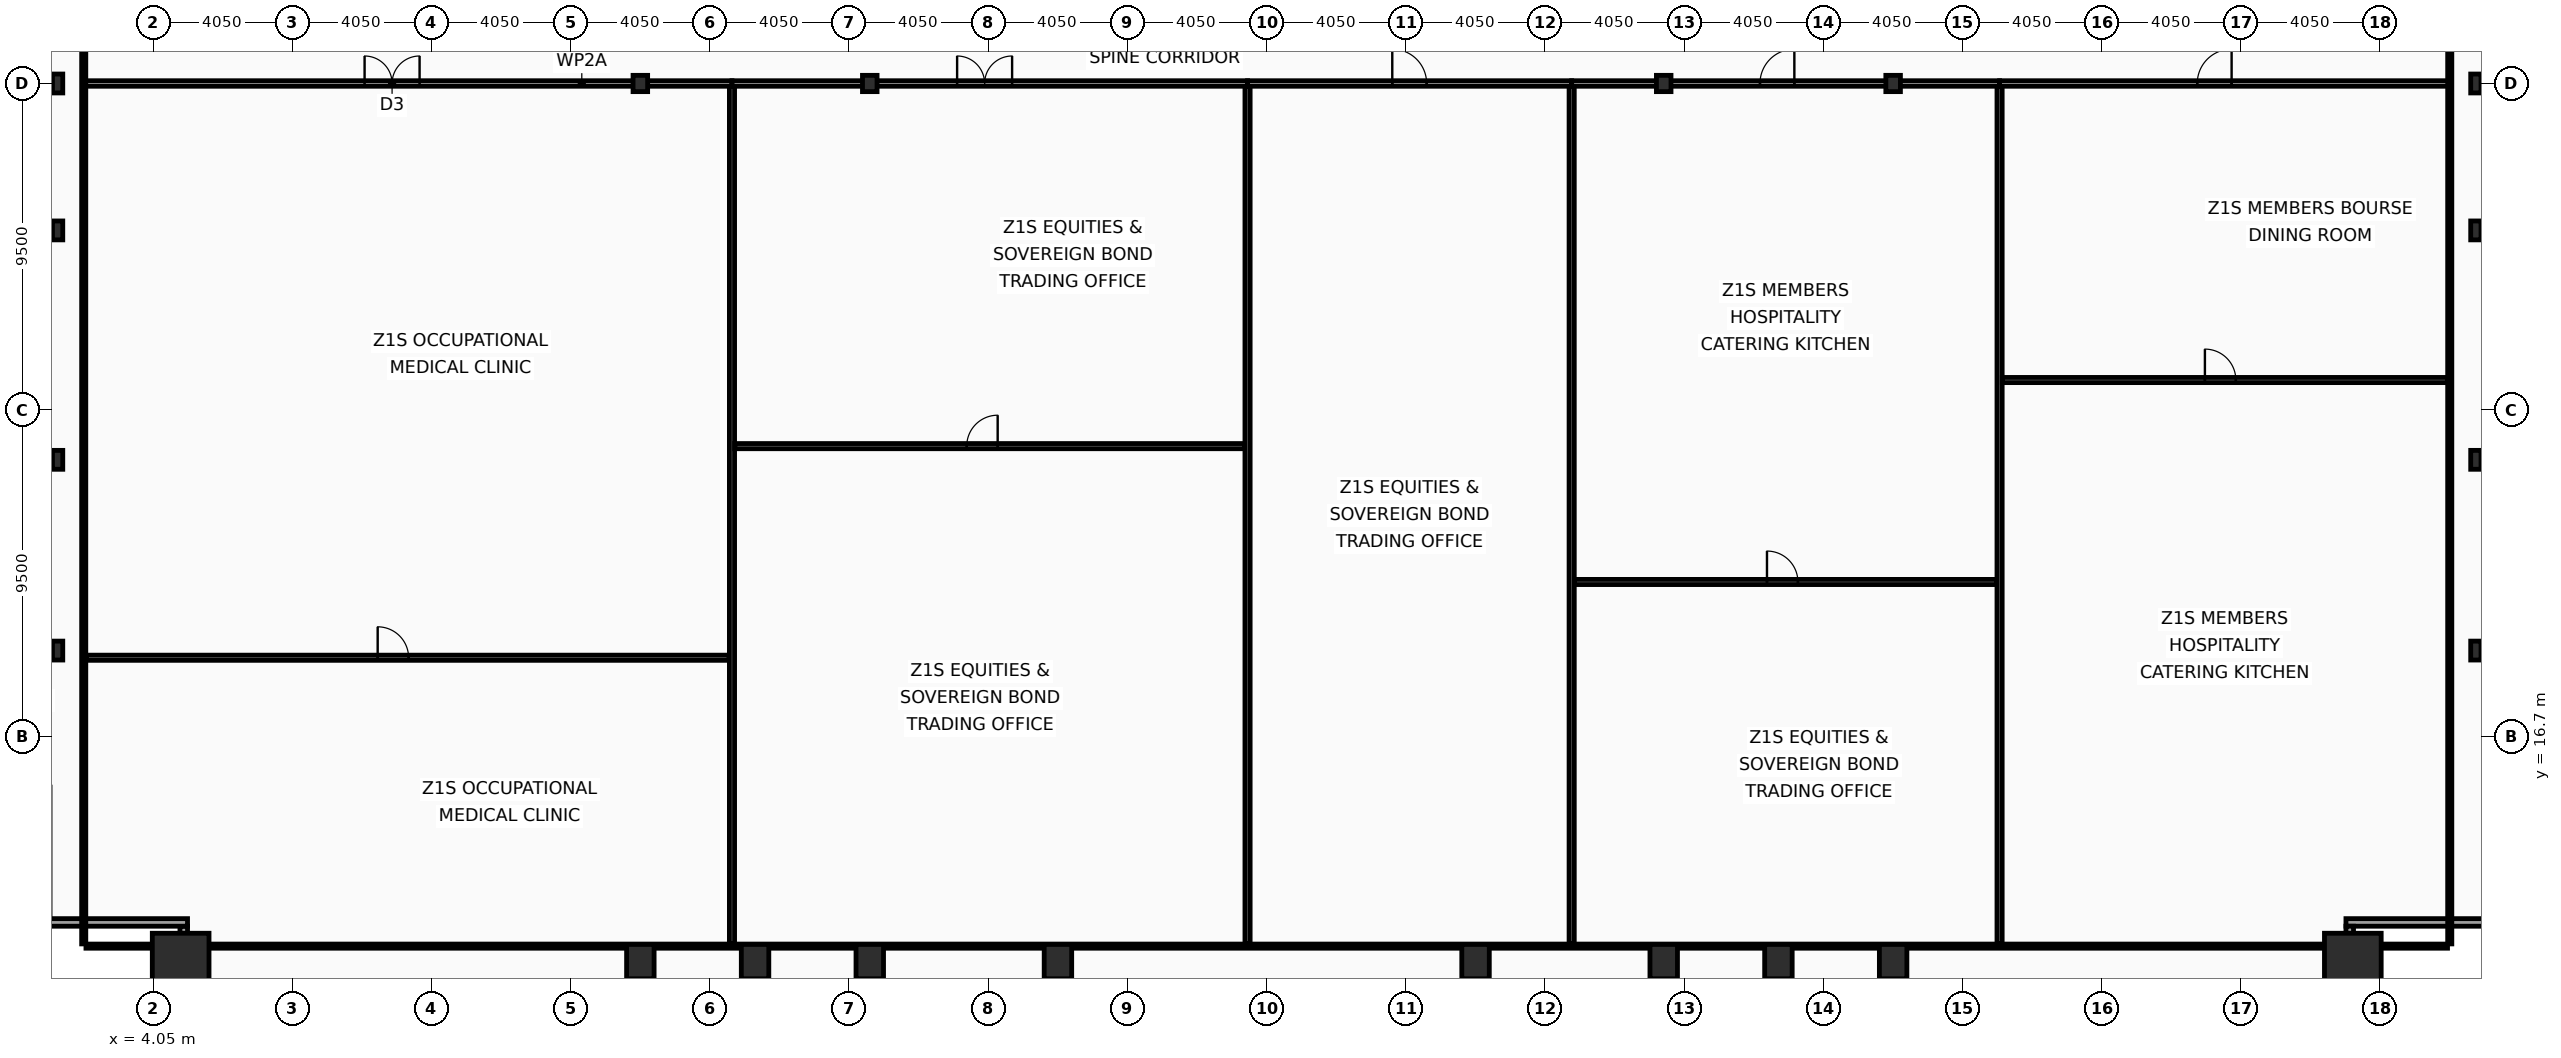
"""IFC4 building model, lengths in metres.
Left out: names, types, materials, properties, quantities, classifications, styles, units other than length and angle.
Written with IfcOpenShell. Run it as: python <this file> out.ifc"""

import sys

from ifc_helpers import new_model, si_unit, direction, frame, frame_2d, origin, origin_2d, place, context, subcontext, project, spatial, rectangle, hollow_rectangle, i_section, extrude, element, fill, save


model = new_model("IFC4")
c1 = context("Model", 3, precision=1e-05, world=origin(), true_north=direction((0.0, 1.0)))
c2 = subcontext(c1, "Body", "Model", "MODEL_VIEW")
j1 = project(units=[si_unit("LENGTHUNIT", "METRE"), si_unit("PLANEANGLEUNIT", "RADIAN")], contexts=[c1])
p1 = place(None, origin())
s1 = spatial("IfcSite", under=j1, at=p1, CompositionType="ELEMENT")
p2 = place(p1, origin())
s2 = spatial("IfcBuilding", under=s1, at=p2, CompositionType="ELEMENT")
p3 = place(p2, frame((0.0, 0.0, 41.8)))
s3 = spatial("IfcBuildingStorey", under=s2, at=p3, CompositionType="ELEMENT", Elevation=41.8)
for number, where, z_axis, x_axis in (
    (1, (4.85, 10.15, 0.0), (0.0, 0.0, 1.0), (1.0, 0.0, 0.0)),
    (2, (68.05, 10.15, 0.0), (0.0, 0.0, 1.0), (1.0, 0.0, 0.0)),
):
    element("IfcColumn", number, at=place(p3, frame(where, z_axis=z_axis, x_axis=x_axis)), inside=s3, PredefinedType="COLUMN", context=c2, shape_type="SweptSolid", body=[
        extrude(hollow_rectangle(XDim=1.65, YDim=1.65, WallThickness=0.075, at=origin_2d()), origin(), (0.0, 0.0, 1.0), 4.0),
    ])
for number, where, z_axis, x_axis in (
    (3, (18.225, 10.15, 0.0), (0.0, 0.0, 1.0), (1.0, 0.0, 0.0)),
    (4, (21.562, 10.15, 0.0), (0.0, 0.0, 1.0), (1.0, 0.0, 0.0)),
    (5, (24.9, 10.15, 0.0), (0.0, 0.0, 1.0), (1.0, 0.0, 0.0)),
    (6, (30.375, 10.15, 0.0), (0.0, 0.0, 1.0), (1.0, 0.0, 0.0)),
    (7, (42.525, 10.15, 0.0), (0.0, 0.0, 1.0), (1.0, 0.0, 0.0)),
    (8, (48.0, 10.15, 0.0), (0.0, 0.0, 1.0), (1.0, 0.0, 0.0)),
    (9, (51.337, 10.15, 0.0), (0.0, 0.0, 1.0), (1.0, 0.0, 0.0)),
    (10, (54.675, 10.15, 0.0), (0.0, 0.0, 1.0), (1.0, 0.0, 0.0)),
):
    element("IfcColumn", number, at=place(p3, frame(where, z_axis=z_axis, x_axis=x_axis)), inside=s3, PredefinedType="COLUMN", context=c2, shape_type="SweptSolid", body=[
        extrude(hollow_rectangle(XDim=0.8, YDim=1.0, WallThickness=0.055, at=origin_2d()), origin(), (0.0, 0.0, 1.0), 4.0),
    ])
for number, where, z_axis, x_axis in (
    (11, (1.27, 19.2, 0.0), (0.0, 0.0, 1.0), (1.0, 0.0, 0.0)),
    (12, (1.27, 24.75, 0.0), (0.0, 0.0, 1.0), (1.0, 0.0, 0.0)),
    (13, (1.27, 31.425, 0.0), (0.0, 0.0, 1.0), (1.0, 0.0, 0.0)),
    (14, (1.27, 35.7, 0.0), (0.0, 0.0, 1.0), (1.0, 0.0, 0.0)),
    (15, (71.63, 19.2, 0.0), (0.0, 0.0, 1.0), (1.0, 0.0, 0.0)),
    (16, (71.63, 24.75, 0.0), (0.0, 0.0, 1.0), (1.0, 0.0, 0.0)),
    (17, (71.63, 31.425, 0.0), (0.0, 0.0, 1.0), (1.0, 0.0, 0.0)),
    (18, (71.63, 35.7, 0.0), (0.0, 0.0, 1.0), (1.0, 0.0, 0.0)),
):
    element("IfcColumn", number, at=place(p3, frame(where, z_axis=z_axis, x_axis=x_axis)), inside=s3, PredefinedType="COLUMN", context=c2, shape_type="SweptSolid", body=[
        extrude(i_section(OverallWidth=0.3, OverallDepth=0.55, WebThickness=0.015, FlangeThickness=0.029, at=origin_2d()), origin(), (0.0, 0.0, 1.0), 4.0),
    ])
for number, where, z_axis, x_axis in (
    (19, (18.225, 35.7, 0.0), (0.0, 0.0, 1.0), (1.0, 0.0, 0.0)),
    (20, (24.9, 35.7, 0.0), (0.0, 0.0, 1.0), (1.0, 0.0, 0.0)),
    (21, (48.0, 35.7, 0.0), (0.0, 0.0, 1.0), (1.0, 0.0, 0.0)),
    (22, (54.675, 35.7, 0.0), (0.0, 0.0, 1.0), (1.0, 0.0, 0.0)),
):
    element("IfcColumn", number, at=place(p3, frame(where, z_axis=z_axis, x_axis=x_axis)), inside=s3, PredefinedType="COLUMN", context=c2, shape_type="SweptSolid", body=[
        extrude(i_section(OverallWidth=0.424, OverallDepth=0.474, WebThickness=0.048, FlangeThickness=0.077, at=origin_2d()), origin(), (0.0, 0.0, 1.0), 4.0),
    ])
p4 = place(p3, frame((4.94, 7.27, 0.0), z_axis=(0.0, 0.0, 1.0), x_axis=(0.0, 1.0, 0.0)))
e23 = element("IfcWall", 23, at=p4, inside=s3, PredefinedType="SOLIDWALL", context=c2, shape_type="SweptSolid", body=[
    extrude(rectangle(XDim=3.91, YDim=0.22, at=frame_2d((1.955, 0.0))), origin(), (0.0, 0.0, 1.0), 3.16),
])
for number, where, z_axis, x_axis in (
    (24, (5.05, 11.29, 0.0), (0.0, 0.0, 1.0), (-1.0, 0.0, 0.0)),
    (25, (72.07, 11.29, 0.0), (0.0, 0.0, 1.0), (-1.0, 0.0, 0.0)),
):
    element("IfcWall", number, at=place(p3, frame(where, z_axis=z_axis, x_axis=x_axis)), inside=s3, PredefinedType="SOLIDWALL", context=c2, shape_type="SweptSolid", body=[
        extrude(rectangle(XDim=4.22, YDim=0.22, at=frame_2d((2.11, 0.0))), origin(), (0.0, 0.0, 1.0), 3.16),
    ])
p5 = place(p3, frame((67.96, 11.18, 0.0), z_axis=(0.0, 0.0, 1.0), x_axis=(0.0, -1.0, 0.0)))
e26 = element("IfcWall", 26, at=p5, inside=s3, PredefinedType="SOLIDWALL", context=c2, shape_type="SweptSolid", body=[
    extrude(rectangle(XDim=3.91, YDim=0.22, at=frame_2d((1.955, 0.0))), origin(), (0.0, 0.0, 1.0), 3.16),
])
p6 = place(p3, frame((2.03, 35.7, 0.0), z_axis=(0.0, 0.0, 1.0), x_axis=(1.0, 0.0, 0.0)))
e27 = element("IfcWall", 27, at=p6, inside=s3, PredefinedType="PARTITIONING", context=c2, shape_type="SweptSolid", body=[
    extrude(rectangle(XDim=18.861, YDim=0.16, at=frame_2d((9.431, 0.0))), origin(), (0.0, 0.0, 1.0), 3.01),
])
p7 = place(p6, frame((8.172, 0.0, 0.0)))
e28 = element("IfcOpeningElement", 28, at=p7, cuts=e27, PredefinedType="OPENING", context=c2, shape_type="SweptSolid", body=[
    extrude(rectangle(XDim=1.6, YDim=2.15, at=frame_2d((0.8, 1.075))), frame((0.0, 0.09, 0.0), z_axis=(0.0, -1.0, 0.0), x_axis=(1.0, 0.0, 0.0)), (0.0, 0.0, 1.0), 0.18),
])
p8 = place(p3, frame((2.095, 18.991, 0.0), z_axis=(0.0, 0.0, 1.0), x_axis=(1.0, 0.0, 0.0)))
e29 = element("IfcWall", 29, at=p8, inside=s3, PredefinedType="PARTITIONING", context=c2, shape_type="SweptSolid", body=[
    extrude(rectangle(XDim=18.716, YDim=0.15, at=frame_2d((9.358, 0.0))), origin(), (0.0, 0.0, 1.0), 3.01),
])
p9 = place(p8, frame((8.487, 0.0, 0.0)))
e30 = element("IfcOpeningElement", 30, at=p9, cuts=e29, PredefinedType="OPENING", context=c2, shape_type="SweptSolid", body=[
    extrude(rectangle(XDim=0.9, YDim=2.05, at=frame_2d((0.45, 1.025))), frame((0.0, 0.085, 0.0), z_axis=(0.0, -1.0, 0.0), x_axis=(1.0, 0.0, 0.0)), (0.0, 0.0, 1.0), 0.17),
])
p10 = place(p3, frame((20.891, 35.7, 0.0), z_axis=(0.0, 0.0, 1.0), x_axis=(1.0, 0.0, 0.0)))
e31 = element("IfcWall", 31, at=p10, inside=s3, PredefinedType="PARTITIONING", context=c2, shape_type="SweptSolid", body=[
    extrude(rectangle(XDim=15.0, YDim=0.16, at=frame_2d((7.5, 0.0))), origin(), (0.0, 0.0, 1.0), 3.01),
])
p11 = place(p10, frame((6.55, 0.0, 0.0)))
e32 = element("IfcOpeningElement", 32, at=p11, cuts=e31, PredefinedType="OPENING", context=c2, shape_type="SweptSolid", body=[
    extrude(rectangle(XDim=1.6, YDim=2.15, at=frame_2d((0.8, 1.075))), frame((0.0, 0.09, 0.0), z_axis=(0.0, -1.0, 0.0), x_axis=(1.0, 0.0, 0.0)), (0.0, 0.0, 1.0), 0.18),
])
p12 = place(p3, frame((20.891, 10.665, 0.0), z_axis=(0.0, 0.0, 1.0), x_axis=(0.0, 1.0, 0.0)))
e33 = element("IfcWall", 33, at=p12, inside=s3, PredefinedType="PARTITIONING", context=c2, shape_type="SweptSolid", body=[
    extrude(rectangle(XDim=24.95, YDim=0.15, at=frame_2d((12.475, 0.0))), origin(), (0.0, 0.0, 1.0), 3.21),
])
p13 = place(p3, frame((20.971, 25.148, 0.0), z_axis=(0.0, 0.0, 1.0), x_axis=(1.0, 0.0, 0.0)))
e34 = element("IfcWall", 34, at=p13, inside=s3, PredefinedType="PARTITIONING", context=c2, shape_type="SweptSolid", body=[
    extrude(rectangle(XDim=14.841, YDim=0.15, at=frame_2d((7.42, 0.0))), origin(), (0.0, 0.0, 1.0), 3.01),
])
p14 = place(p13, frame((6.75, 0.0, 0.0)))
e35 = element("IfcOpeningElement", 35, at=p14, cuts=e34, PredefinedType="OPENING", context=c2, shape_type="SweptSolid", body=[
    extrude(rectangle(XDim=0.9, YDim=2.05, at=frame_2d((0.45, 1.025))), frame((0.0, 0.085, 0.0), z_axis=(0.0, -1.0, 0.0), x_axis=(1.0, 0.0, 0.0)), (0.0, 0.0, 1.0), 0.17),
])
p15 = place(p3, frame((35.892, 35.7, 0.0), z_axis=(0.0, 0.0, 1.0), x_axis=(1.0, 0.0, 0.0)))
e36 = element("IfcWall", 36, at=p15, inside=s3, PredefinedType="PARTITIONING", context=c2, shape_type="SweptSolid", body=[
    extrude(rectangle(XDim=9.43, YDim=0.16, at=frame_2d((4.715, 0.0))), origin(), (0.0, 0.0, 1.0), 3.01),
])
p16 = place(p15, frame((4.211, 0.0, 0.0)))
e37 = element("IfcOpeningElement", 37, at=p16, cuts=e36, PredefinedType="OPENING", context=c2, shape_type="SweptSolid", body=[
    extrude(rectangle(XDim=1.0, YDim=2.05, at=frame_2d((0.5, 1.025))), frame((0.0, 0.09, 0.0), z_axis=(0.0, -1.0, 0.0), x_axis=(1.0, 0.0, 0.0)), (0.0, 0.0, 1.0), 0.18),
])
p17 = place(p3, frame((35.892, 10.665, 0.0), z_axis=(0.0, 0.0, 1.0), x_axis=(0.0, 1.0, 0.0)))
e38 = element("IfcWall", 38, at=p17, inside=s3, PredefinedType="PARTITIONING", context=c2, shape_type="SweptSolid", body=[
    extrude(rectangle(XDim=24.95, YDim=0.15, at=frame_2d((12.475, 0.0))), origin(), (0.0, 0.0, 1.0), 3.21),
])
p18 = place(p3, frame((45.322, 35.7, 0.0), z_axis=(0.0, 0.0, 1.0), x_axis=(1.0, 0.0, 0.0)))
e39 = element("IfcWall", 39, at=p18, inside=s3, PredefinedType="PARTITIONING", context=c2, shape_type="SweptSolid", body=[
    extrude(rectangle(XDim=12.45, YDim=0.16, at=frame_2d((6.225, 0.0))), origin(), (0.0, 0.0, 1.0), 3.01),
])
p19 = place(p18, frame((5.479, 0.0, 0.0)))
e40 = element("IfcOpeningElement", 40, at=p19, cuts=e39, PredefinedType="OPENING", context=c2, shape_type="SweptSolid", body=[
    extrude(rectangle(XDim=1.0, YDim=2.05, at=frame_2d((0.5, 1.025))), frame((0.0, 0.09, 0.0), z_axis=(0.0, -1.0, 0.0), x_axis=(1.0, 0.0, 0.0)), (0.0, 0.0, 1.0), 0.18),
])
p20 = place(p3, frame((45.322, 10.665, 0.0), z_axis=(0.0, 0.0, 1.0), x_axis=(0.0, 1.0, 0.0)))
e41 = element("IfcWall", 41, at=p20, inside=s3, PredefinedType="PARTITIONING", context=c2, shape_type="SweptSolid", body=[
    extrude(rectangle(XDim=24.95, YDim=0.15, at=frame_2d((12.475, 0.0))), origin(), (0.0, 0.0, 1.0), 3.21),
])
p21 = place(p3, frame((45.402, 21.196, 0.0), z_axis=(0.0, 0.0, 1.0), x_axis=(1.0, 0.0, 0.0)))
e42 = element("IfcWall", 42, at=p21, inside=s3, PredefinedType="PARTITIONING", context=c2, shape_type="SweptSolid", body=[
    extrude(rectangle(XDim=12.29, YDim=0.15, at=frame_2d((6.145, 0.0))), origin(), (0.0, 0.0, 1.0), 3.01),
])
p22 = place(p21, frame((5.603, 0.0, 0.0)))
e43 = element("IfcOpeningElement", 43, at=p22, cuts=e42, PredefinedType="OPENING", context=c2, shape_type="SweptSolid", body=[
    extrude(rectangle(XDim=0.9, YDim=2.05, at=frame_2d((0.45, 1.025))), frame((0.0, 0.085, 0.0), z_axis=(0.0, -1.0, 0.0), x_axis=(1.0, 0.0, 0.0)), (0.0, 0.0, 1.0), 0.17),
])
p23 = place(p3, frame((57.772, 35.7, 0.0), z_axis=(0.0, 0.0, 1.0), x_axis=(1.0, 0.0, 0.0)))
e44 = element("IfcWall", 44, at=p23, inside=s3, PredefinedType="PARTITIONING", context=c2, shape_type="SweptSolid", body=[
    extrude(rectangle(XDim=13.098, YDim=0.16, at=frame_2d((6.549, 0.0))), origin(), (0.0, 0.0, 1.0), 3.01),
])
p24 = place(p23, frame((5.751, 0.0, 0.0)))
e45 = element("IfcOpeningElement", 45, at=p24, cuts=e44, PredefinedType="OPENING", context=c2, shape_type="SweptSolid", body=[
    extrude(rectangle(XDim=1.0, YDim=2.05, at=frame_2d((0.5, 1.025))), frame((0.0, 0.09, 0.0), z_axis=(0.0, -1.0, 0.0), x_axis=(1.0, 0.0, 0.0)), (0.0, 0.0, 1.0), 0.18),
])
p25 = place(p3, frame((57.772, 10.665, 0.0), z_axis=(0.0, 0.0, 1.0), x_axis=(0.0, 1.0, 0.0)))
e46 = element("IfcWall", 46, at=p25, inside=s3, PredefinedType="PARTITIONING", context=c2, shape_type="SweptSolid", body=[
    extrude(rectangle(XDim=24.95, YDim=0.15, at=frame_2d((12.475, 0.0))), origin(), (0.0, 0.0, 1.0), 3.01),
])
p26 = place(p3, frame((57.852, 27.072, 0.0), z_axis=(0.0, 0.0, 1.0), x_axis=(1.0, 0.0, 0.0)))
e47 = element("IfcWall", 47, at=p26, inside=s3, PredefinedType="PARTITIONING", context=c2, shape_type="SweptSolid", body=[
    extrude(rectangle(XDim=12.953, YDim=0.15, at=frame_2d((6.477, 0.0))), origin(), (0.0, 0.0, 1.0), 3.82),
])
p27 = place(p26, frame((5.894, 0.0, 0.0)))
e48 = element("IfcOpeningElement", 48, at=p27, cuts=e47, PredefinedType="OPENING", context=c2, shape_type="SweptSolid", body=[
    extrude(rectangle(XDim=0.9, YDim=2.05, at=frame_2d((0.45, 1.025))), frame((0.0, 0.085, 0.0), z_axis=(0.0, -1.0, 0.0), x_axis=(1.0, 0.0, 0.0)), (0.0, 0.0, 1.0), 0.17),
])
for number, where, z_axis, x_axis in (
    (49, (2.03, 10.665, 0.0), (0.0, 0.0, 1.0), (0.0, 1.0, 0.0)),
    (50, (70.87, 10.665, 0.0), (0.0, 0.0, 1.0), (0.0, 1.0, 0.0)),
):
    element("IfcWall", number, at=place(p3, frame(where, z_axis=z_axis, x_axis=x_axis)), inside=s3, PredefinedType="PARTITIONING", context=c2, shape_type="SweptSolid", body=[
        extrude(rectangle(XDim=42.11, YDim=0.12, at=frame_2d((21.055, 0.0))), origin(), (0.0, 0.0, 1.0), 3.01),
    ])
p28 = place(p3, frame((2.095, 10.6, 0.0), z_axis=(0.0, 0.0, 1.0), x_axis=(1.0, 0.0, 0.0)))
e51 = element("IfcWall", 51, at=p28, inside=s3, PredefinedType="PARTITIONING", context=c2, shape_type="SweptSolid", body=[
    extrude(rectangle(XDim=68.71, YDim=0.12, at=frame_2d((34.355, 0.0))), origin(), (0.0, 0.0, 1.0), 3.01),
])
p29 = place(p7, origin())
e52 = element("IfcDoor", 52, at=p29, inside=s3, OperationType="DOUBLE_DOOR_SINGLE_SWING", PredefinedType="DOOR", context=c2, shape_type="SweptSolid", body=[
    extrude(rectangle(XDim=1.6, YDim=2.15, at=frame_2d((0.8, 1.075))), frame((0.0, 0.025, 0.0), z_axis=(0.0, -1.0, 0.0), x_axis=(1.0, 0.0, 0.0)), (0.0, 0.0, 1.0), 0.05),
])
fill(e28, e52)
p30 = place(p9, origin())
e53 = element("IfcDoor", 53, at=p30, inside=s3, OperationType="SINGLE_SWING_LEFT", PredefinedType="DOOR", context=c2, shape_type="SweptSolid", body=[
    extrude(rectangle(XDim=0.9, YDim=2.05, at=frame_2d((0.45, 1.025))), frame((0.0, 0.025, 0.0), z_axis=(0.0, -1.0, 0.0), x_axis=(1.0, 0.0, 0.0)), (0.0, 0.0, 1.0), 0.05),
])
fill(e30, e53)
p31 = place(p11, origin())
e54 = element("IfcDoor", 54, at=p31, inside=s3, OperationType="DOUBLE_DOOR_SINGLE_SWING", PredefinedType="DOOR", context=c2, shape_type="SweptSolid", body=[
    extrude(rectangle(XDim=1.6, YDim=2.15, at=frame_2d((0.8, 1.075))), frame((0.0, 0.025, 0.0), z_axis=(0.0, -1.0, 0.0), x_axis=(1.0, 0.0, 0.0)), (0.0, 0.0, 1.0), 0.05),
])
fill(e32, e54)
p32 = place(p14, origin())
e55 = element("IfcDoor", 55, at=p32, inside=s3, OperationType="SINGLE_SWING_RIGHT", PredefinedType="DOOR", context=c2, shape_type="SweptSolid", body=[
    extrude(rectangle(XDim=0.9, YDim=2.05, at=frame_2d((0.45, 1.025))), frame((0.0, 0.025, 0.0), z_axis=(0.0, -1.0, 0.0), x_axis=(1.0, 0.0, 0.0)), (0.0, 0.0, 1.0), 0.05),
])
fill(e35, e55)
p33 = place(p16, origin())
e56 = element("IfcDoor", 56, at=p33, inside=s3, OperationType="SINGLE_SWING_LEFT", PredefinedType="DOOR", context=c2, shape_type="SweptSolid", body=[
    extrude(rectangle(XDim=1.0, YDim=2.05, at=frame_2d((0.5, 1.025))), frame((0.0, 0.025, 0.0), z_axis=(0.0, -1.0, 0.0), x_axis=(1.0, 0.0, 0.0)), (0.0, 0.0, 1.0), 0.05),
])
fill(e37, e56)
p34 = place(p19, origin())
e57 = element("IfcDoor", 57, at=p34, inside=s3, OperationType="SINGLE_SWING_RIGHT", PredefinedType="DOOR", context=c2, shape_type="SweptSolid", body=[
    extrude(rectangle(XDim=1.0, YDim=2.05, at=frame_2d((0.5, 1.025))), frame((0.0, 0.025, 0.0), z_axis=(0.0, -1.0, 0.0), x_axis=(1.0, 0.0, 0.0)), (0.0, 0.0, 1.0), 0.05),
])
fill(e40, e57)
p35 = place(p22, origin())
e58 = element("IfcDoor", 58, at=p35, inside=s3, OperationType="SINGLE_SWING_LEFT", PredefinedType="DOOR", context=c2, shape_type="SweptSolid", body=[
    extrude(rectangle(XDim=0.9, YDim=2.05, at=frame_2d((0.45, 1.025))), frame((0.0, 0.025, 0.0), z_axis=(0.0, -1.0, 0.0), x_axis=(1.0, 0.0, 0.0)), (0.0, 0.0, 1.0), 0.05),
])
fill(e43, e58)
p36 = place(p24, origin())
e59 = element("IfcDoor", 59, at=p36, inside=s3, OperationType="SINGLE_SWING_RIGHT", PredefinedType="DOOR", context=c2, shape_type="SweptSolid", body=[
    extrude(rectangle(XDim=1.0, YDim=2.05, at=frame_2d((0.5, 1.025))), frame((0.0, 0.025, 0.0), z_axis=(0.0, -1.0, 0.0), x_axis=(1.0, 0.0, 0.0)), (0.0, 0.0, 1.0), 0.05),
])
fill(e45, e59)
p37 = place(p27, origin())
e60 = element("IfcDoor", 60, at=p37, inside=s3, OperationType="SINGLE_SWING_LEFT", PredefinedType="DOOR", context=c2, shape_type="SweptSolid", body=[
    extrude(rectangle(XDim=0.9, YDim=2.05, at=frame_2d((0.45, 1.025))), frame((0.0, 0.025, 0.0), z_axis=(0.0, -1.0, 0.0), x_axis=(1.0, 0.0, 0.0)), (0.0, 0.0, 1.0), 0.05),
])
fill(e48, e60)
save(model, sys.argv[1])
